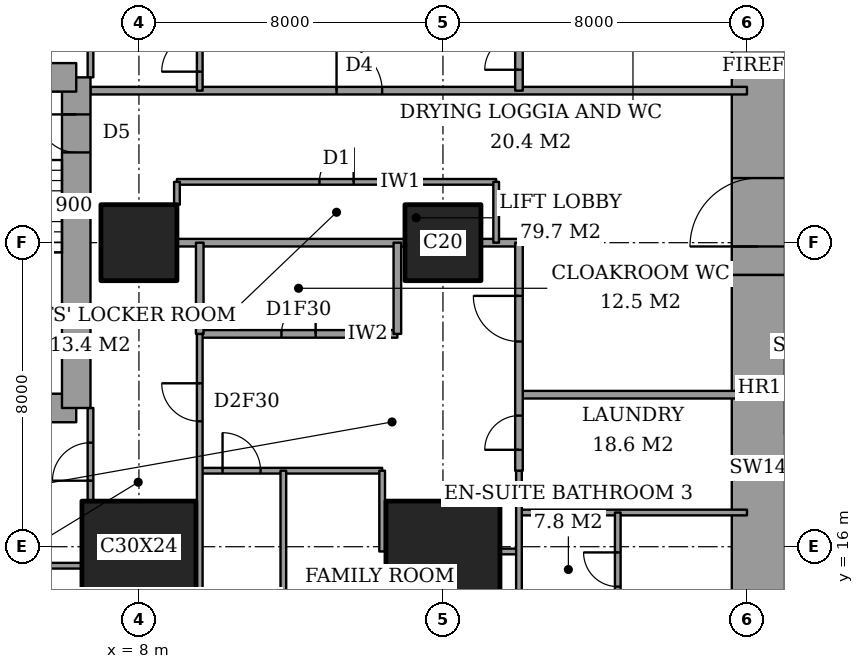
"""IFC4 building model, lengths in metres.
Left out: names, types, materials, properties, quantities, classifications, styles, units other than length and angle.
Written with IfcOpenShell. Run it as: python <this file> out.ifc"""

import sys

from ifc_helpers import new_model, si_unit, direction, frame, frame_2d, origin, origin_2d, place, context, subcontext, project, spatial, rectangle, extrude, element, fill, save


model = new_model("IFC4")
c1 = context("Model", 3, precision=1e-05, world=origin(), true_north=direction((0.0, 1.0)))
c2 = subcontext(c1, "Body", "Model", "MODEL_VIEW")
j1 = project(units=[si_unit("LENGTHUNIT", "METRE"), si_unit("PLANEANGLEUNIT", "RADIAN")], contexts=[c1])
p1 = place(None, origin())
s1 = spatial("IfcSite", under=j1, at=p1, CompositionType="ELEMENT")
p2 = place(p1, origin())
s2 = spatial("IfcBuilding", under=s1, at=p2, CompositionType="ELEMENT")
p3 = place(p2, frame((0.0, 0.0, 58.4)))
s3 = spatial("IfcBuildingStorey", under=s2, at=p3, CompositionType="ELEMENT", Elevation=58.4)
p4 = place(p3, frame((8.0, 16.0, 0.0), z_axis=(0.0, 0.0, 1.0), x_axis=(1.0, 0.0, 0.0)))
e1 = element("IfcColumn", 1, at=p4, inside=s3, PredefinedType="COLUMN", context=c2, shape_type="SweptSolid", body=[
    extrude(rectangle(XDim=3.0, YDim=2.4, at=origin_2d()), origin(), (0.0, 0.0, 1.0), 3.6),
])
p5 = place(p3, frame((8.0, 24.0, 0.0), z_axis=(0.0, 0.0, 1.0), x_axis=(1.0, 0.0, 0.0)))
e2 = element("IfcColumn", 2, at=p5, inside=s3, PredefinedType="COLUMN", context=c2, shape_type="SweptSolid", body=[
    extrude(rectangle(XDim=2.0, YDim=2.0, at=origin_2d()), origin(), (0.0, 0.0, 1.0), 3.6),
])
p6 = place(p3, frame((16.0, 16.0, 0.0), z_axis=(0.0, 0.0, 1.0), x_axis=(1.0, 0.0, 0.0)))
e3 = element("IfcColumn", 3, at=p6, inside=s3, PredefinedType="COLUMN", context=c2, shape_type="SweptSolid", body=[
    extrude(rectangle(XDim=3.0, YDim=2.4, at=origin_2d()), origin(), (0.0, 0.0, 1.0), 3.6),
])
p7 = place(p3, frame((16.0, 24.0, 0.0), z_axis=(0.0, 0.0, 1.0), x_axis=(1.0, 0.0, 0.0)))
e4 = element("IfcColumn", 4, at=p7, inside=s3, PredefinedType="COLUMN", context=c2, shape_type="SweptSolid", body=[
    extrude(rectangle(XDim=2.0, YDim=2.0, at=origin_2d()), origin(), (0.0, 0.0, 1.0), 3.6),
])
p8 = place(p3, frame((24.3, 13.0, 0.0), z_axis=(0.0, 0.0, 1.0), x_axis=(0.0, 1.0, 0.0)))
e5 = element("IfcWall", 5, at=p8, inside=s3, PredefinedType="SHEAR", context=c2, shape_type="SweptSolid", body=[
    extrude(rectangle(XDim=10.15, YDim=1.4, at=frame_2d((5.075, 0.0))), origin(), (0.0, 0.0, 1.0), 3.6),
])
p9 = place(p3, frame((24.3, 23.15, 0.0), z_axis=(0.0, 0.0, 1.0), x_axis=(0.0, 1.0, 0.0)))
e6 = element("IfcWall", 6, at=p9, inside=s3, PredefinedType="SHEAR", context=c2, shape_type="SweptSolid", body=[
    extrude(rectangle(XDim=11.85, YDim=1.4, at=frame_2d((5.925, 0.0))), origin(), (0.0, 0.0, 1.0), 3.6),
])
p10 = place(p9, frame((0.75, 0.0, 0.0)))
e7 = element("IfcOpeningElement", 7, at=p10, cuts=e6, PredefinedType="OPENING", context=c2, shape_type="SweptSolid", body=[
    extrude(rectangle(XDim=1.8, YDim=2.4, at=frame_2d((0.9, 1.2))), frame((0.0, 0.71, 0.0), z_axis=(0.0, -1.0, 0.0), x_axis=(1.0, 0.0, 0.0)), (0.0, 0.0, 1.0), 1.42),
])
p11 = place(p3, frame((1.9, 19.65, 0.0), z_axis=(0.0, 0.0, 1.0), x_axis=(1.0, 0.0, 0.0)))
e8 = element("IfcWall", 8, at=p11, inside=s3, PredefinedType="SHEAR", context=c2, shape_type="SweptSolid", body=[
    extrude(rectangle(XDim=4.45, YDim=0.75, at=frame_2d((2.225, 0.0))), origin(), (0.0, 0.0, 1.0), 3.6),
])
p12 = place(p3, frame((6.35, 19.65, 0.0), z_axis=(0.0, 0.0, 1.0), x_axis=(0.0, 1.0, 0.0)))
e9 = element("IfcWall", 9, at=p12, inside=s3, PredefinedType="SHEAR", context=c2, shape_type="SweptSolid", body=[
    extrude(rectangle(XDim=8.7, YDim=0.75, at=frame_2d((4.35, 0.0))), origin(), (0.0, 0.0, 1.0), 3.6),
])
p13 = place(p12, frame((6.725, 0.0, 0.0)))
e10 = element("IfcOpeningElement", 10, at=p13, cuts=e9, PredefinedType="OPENING", context=c2, shape_type="SweptSolid", body=[
    extrude(rectangle(XDim=1.0, YDim=2.1, at=frame_2d((0.5, 1.05))), frame((0.0, 0.385, 0.0), z_axis=(0.0, -1.0, 0.0), x_axis=(1.0, 0.0, 0.0)), (0.0, 0.0, 1.0), 0.77),
])
p14 = place(p3, frame((6.35, 28.35, 0.0), z_axis=(0.0, 0.0, 1.0), x_axis=(-1.0, 0.0, 0.0)))
e11 = element("IfcWall", 11, at=p14, inside=s3, PredefinedType="SHEAR", context=c2, shape_type="SweptSolid", body=[
    extrude(rectangle(XDim=4.45, YDim=0.75, at=frame_2d((2.225, 0.0))), origin(), (0.0, 0.0, 1.0), 3.6),
])
p15 = place(p3, frame((1.35, 15.5, 0.0), z_axis=(0.0, 0.0, 1.0), x_axis=(1.0, 0.0, 0.0)))
e12 = element("IfcWall", 12, at=p15, inside=s3, PredefinedType="PARTITIONING", context=c2, shape_type="SweptSolid", body=[
    extrude(rectangle(XDim=5.15, YDim=0.15, at=frame_2d((2.575, 0.0))), origin(), (0.0, 0.0, 1.0), 3.35),
])
p16 = place(p3, frame((17.5, 15.875, 0.0), z_axis=(0.0, 0.0, 1.0), x_axis=(1.0, 0.0, 0.0)))
e13 = element("IfcWall", 13, at=p16, inside=s3, PredefinedType="PARTITIONING", context=c2, shape_type="SweptSolid", body=[
    extrude(rectangle(XDim=0.5, YDim=0.15, at=frame_2d((0.25, 0.0))), origin(), (0.0, 0.0, 1.0), 2.634),
])
p17 = place(p3, frame((18.0, 16.9, 0.0), z_axis=(0.0, 0.0, 1.0), x_axis=(1.0, 0.0, 0.0)))
e14 = element("IfcWall", 14, at=p17, inside=s3, PredefinedType="PARTITIONING", context=c2, shape_type="SweptSolid", body=[
    extrude(rectangle(XDim=6.0, YDim=0.15, at=frame_2d((3.0, 0.0))), origin(), (0.0, 0.0, 1.0), 3.35),
])
p18 = place(p3, frame((9.6, 18.0, 0.0), z_axis=(0.0, 0.0, 1.0), x_axis=(1.0, 0.0, 0.0)))
e15 = element("IfcWall", 15, at=p18, inside=s3, PredefinedType="PARTITIONING", context=c2, shape_type="SweptSolid", body=[
    extrude(rectangle(XDim=4.8, YDim=0.15, at=frame_2d((2.4, 0.0))), origin(), (0.0, 0.0, 1.0), 3.35),
])
p19 = place(p18, frame((0.6, 0.0, 0.0)))
e16 = element("IfcOpeningElement", 16, at=p19, cuts=e15, PredefinedType="OPENING", context=c2, shape_type="SweptSolid", body=[
    extrude(rectangle(XDim=1.0, YDim=2.1, at=frame_2d((0.5, 1.05))), frame((0.0, 0.085, 0.0), z_axis=(0.0, -1.0, 0.0), x_axis=(1.0, 0.0, 0.0)), (0.0, 0.0, 1.0), 0.17),
])
p20 = place(p3, frame((18.0, 20.0, 0.0), z_axis=(0.0, 0.0, 1.0), x_axis=(1.0, 0.0, 0.0)))
e17 = element("IfcWall", 17, at=p20, inside=s3, PredefinedType="PARTITIONING", context=c2, shape_type="SweptSolid", body=[
    extrude(rectangle(XDim=6.0, YDim=0.2, at=frame_2d((3.0, 0.0))), origin(), (0.0, 0.0, 1.0), 3.35),
])
p21 = place(p3, frame((9.6, 21.6, 0.0), z_axis=(0.0, 0.0, 1.0), x_axis=(1.0, 0.0, 0.0)))
e18 = element("IfcWall", 18, at=p21, inside=s3, PredefinedType="PARTITIONING", context=c2, shape_type="SweptSolid", body=[
    extrude(rectangle(XDim=5.2, YDim=0.2, at=frame_2d((2.6, 0.0))), origin(), (0.0, 0.0, 1.0), 3.35),
])
p22 = place(p21, frame((2.15, 0.0, 0.0)))
e19 = element("IfcOpeningElement", 19, at=p22, cuts=e18, PredefinedType="OPENING", context=c2, shape_type="SweptSolid", body=[
    extrude(rectangle(XDim=0.9, YDim=2.1, at=frame_2d((0.45, 1.05))), frame((0.0, 0.11, 0.0), z_axis=(0.0, -1.0, 0.0), x_axis=(1.0, 0.0, 0.0)), (0.0, 0.0, 1.0), 0.22),
])
p23 = place(p3, frame((9.0, 24.0, 0.0), z_axis=(0.0, 0.0, 1.0), x_axis=(1.0, 0.0, 0.0)))
e20 = element("IfcWall", 20, at=p23, inside=s3, PredefinedType="PARTITIONING", context=c2, shape_type="SweptSolid", body=[
    extrude(rectangle(XDim=6.0, YDim=0.2, at=frame_2d((3.0, 0.0))), origin(), (0.0, 0.0, 1.0), 3.35),
])
p24 = place(p3, frame((17.0, 24.0, 0.0), z_axis=(0.0, 0.0, 1.0), x_axis=(1.0, 0.0, 0.0)))
e21 = element("IfcWall", 21, at=p24, inside=s3, PredefinedType="PARTITIONING", context=c2, shape_type="SweptSolid", body=[
    extrude(rectangle(XDim=1.0, YDim=0.2, at=frame_2d((0.5, 0.0))), origin(), (0.0, 0.0, 1.0), 3.35),
])
p25 = place(p3, frame((9.0, 25.6, 0.0), z_axis=(0.0, 0.0, 1.0), x_axis=(1.0, 0.0, 0.0)))
e22 = element("IfcWall", 22, at=p25, inside=s3, PredefinedType="PARTITIONING", context=c2, shape_type="SweptSolid", body=[
    extrude(rectangle(XDim=8.4, YDim=0.15, at=frame_2d((4.2, 0.0))), origin(), (0.0, 0.0, 1.0), 3.35),
])
p26 = place(p25, frame((3.75, 0.0, 0.0)))
e23 = element("IfcOpeningElement", 23, at=p26, cuts=e22, PredefinedType="OPENING", context=c2, shape_type="SweptSolid", body=[
    extrude(rectangle(XDim=0.9, YDim=2.1, at=frame_2d((0.45, 1.05))), frame((0.0, 0.085, 0.0), z_axis=(0.0, -1.0, 0.0), x_axis=(1.0, 0.0, 0.0)), (0.0, 0.0, 1.0), 0.17),
])
p27 = place(p3, frame((6.725, 28.0, 0.0), z_axis=(0.0, 0.0, 1.0), x_axis=(1.0, 0.0, 0.0)))
e24 = element("IfcWall", 24, at=p27, inside=s3, PredefinedType="PARTITIONING", context=c2, shape_type="SweptSolid", body=[
    extrude(rectangle(XDim=17.275, YDim=0.2, at=frame_2d((8.637, 0.0))), origin(), (0.0, 0.0, 1.0), 3.35),
])
p28 = place(p27, frame((6.475, 0.0, 0.0)))
e25 = element("IfcOpeningElement", 25, at=p28, cuts=e24, PredefinedType="OPENING", context=c2, shape_type="SweptSolid", body=[
    extrude(rectangle(XDim=1.2, YDim=2.4, at=frame_2d((0.6, 1.2))), frame((0.0, 0.11, 0.0), z_axis=(0.0, -1.0, 0.0), x_axis=(1.0, 0.0, 0.0)), (0.0, 0.0, 1.0), 0.22),
])
p29 = place(p3, frame((6.725, 17.2, 0.0), z_axis=(0.0, 0.0, 1.0), x_axis=(0.0, 1.0, 0.0)))
e26 = element("IfcWall", 26, at=p29, inside=s3, PredefinedType="PARTITIONING", context=c2, shape_type="SweptSolid", body=[
    extrude(rectangle(XDim=2.45, YDim=0.15, at=frame_2d((1.225, 0.0))), origin(), (0.0, 0.0, 1.0), 3.35),
])
p30 = place(p29, frame((0.538, 0.0, 0.0)))
e27 = element("IfcOpeningElement", 27, at=p30, cuts=e26, PredefinedType="OPENING", context=c2, shape_type="SweptSolid", body=[
    extrude(rectangle(XDim=1.0, YDim=2.1, at=frame_2d((0.5, 1.05))), frame((0.0, 0.085, 0.0), z_axis=(0.0, -1.0, 0.0), x_axis=(1.0, 0.0, 0.0)), (0.0, 0.0, 1.0), 0.17),
])
p31 = place(p3, frame((6.725, 28.35, 0.0), z_axis=(0.0, 0.0, 1.0), x_axis=(0.0, 1.0, 0.0)))
e28 = element("IfcWall", 28, at=p31, inside=s3, PredefinedType="PARTITIONING", context=c2, shape_type="SweptSolid", body=[
    extrude(rectangle(XDim=2.45, YDim=0.15, at=frame_2d((1.225, 0.0))), origin(), (0.0, 0.0, 1.0), 3.35),
])
p32 = place(p31, frame((0.913, 0.0, 0.0)))
e29 = element("IfcOpeningElement", 29, at=p32, cuts=e28, PredefinedType="OPENING", context=c2, shape_type="SweptSolid", body=[
    extrude(rectangle(XDim=1.0, YDim=2.1, at=frame_2d((0.5, 1.05))), frame((0.0, 0.085, 0.0), z_axis=(0.0, -1.0, 0.0), x_axis=(1.0, 0.0, 0.0)), (0.0, 0.0, 1.0), 0.17),
])
p33 = place(p3, frame((9.0, 25.0, 0.0), z_axis=(0.0, 0.0, 1.0), x_axis=(0.0, 1.0, 0.0)))
e30 = element("IfcWall", 30, at=p33, inside=s3, PredefinedType="PARTITIONING", context=c2, shape_type="SweptSolid", body=[
    extrude(rectangle(XDim=0.6, YDim=0.15, at=frame_2d((0.3, 0.0))), origin(), (0.0, 0.0, 1.0), 3.35),
])
p34 = place(p3, frame((9.6, 21.6, 0.0), z_axis=(0.0, 0.0, 1.0), x_axis=(0.0, 1.0, 0.0)))
e31 = element("IfcWall", 31, at=p34, inside=s3, PredefinedType="PARTITIONING", context=c2, shape_type="SweptSolid", body=[
    extrude(rectangle(XDim=2.4, YDim=0.2, at=frame_2d((1.2, 0.0))), origin(), (0.0, 0.0, 1.0), 3.35),
])
p35 = place(p3, frame((9.6, 10.6, 0.0), z_axis=(0.0, 0.0, 1.0), x_axis=(0.0, 1.0, 0.0)))
e32 = element("IfcWall", 32, at=p35, inside=s3, PredefinedType="PARTITIONING", context=c2, shape_type="SweptSolid", body=[
    extrude(rectangle(XDim=11.0, YDim=0.15, at=frame_2d((5.5, 0.0))), origin(), (0.0, 0.0, 1.0), 3.35),
])
p36 = place(p35, frame((8.7, 0.0, 0.0)))
e33 = element("IfcOpeningElement", 33, at=p36, cuts=e32, PredefinedType="OPENING", context=c2, shape_type="SweptSolid", body=[
    extrude(rectangle(XDim=1.0, YDim=2.1, at=frame_2d((0.5, 1.05))), frame((0.0, 0.085, 0.0), z_axis=(0.0, -1.0, 0.0), x_axis=(1.0, 0.0, 0.0)), (0.0, 0.0, 1.0), 0.17),
])
p37 = place(p3, frame((9.6, 28.0, 0.0), z_axis=(0.0, 0.0, 1.0), x_axis=(0.0, 1.0, 0.0)))
e34 = element("IfcWall", 34, at=p37, inside=s3, PredefinedType="PARTITIONING", context=c2, shape_type="SweptSolid", body=[
    extrude(rectangle(XDim=9.4, YDim=0.15, at=frame_2d((4.7, 0.0))), origin(), (0.0, 0.0, 1.0), 3.35),
])
p38 = place(p37, frame((0.5, 0.0, 0.0)))
e35 = element("IfcOpeningElement", 35, at=p38, cuts=e34, PredefinedType="OPENING", context=c2, shape_type="SweptSolid", body=[
    extrude(rectangle(XDim=1.0, YDim=2.1, at=frame_2d((0.5, 1.05))), frame((0.0, 0.085, 0.0), z_axis=(0.0, -1.0, 0.0), x_axis=(1.0, 0.0, 0.0)), (0.0, 0.0, 1.0), 0.17),
])
p39 = place(p3, frame((11.8, 10.6, 0.0), z_axis=(0.0, 0.0, 1.0), x_axis=(0.0, 1.0, 0.0)))
e36 = element("IfcWall", 36, at=p39, inside=s3, PredefinedType="PARTITIONING", context=c2, shape_type="SweptSolid", body=[
    extrude(rectangle(XDim=7.4, YDim=0.15, at=frame_2d((3.7, 0.0))), origin(), (0.0, 0.0, 1.0), 3.35),
])
p40 = place(p3, frame((14.4, 15.875, 0.0), z_axis=(0.0, 0.0, 1.0), x_axis=(0.0, 1.0, 0.0)))
e37 = element("IfcWall", 37, at=p40, inside=s3, PredefinedType="PARTITIONING", context=c2, shape_type="SweptSolid", body=[
    extrude(rectangle(XDim=2.125, YDim=0.15, at=frame_2d((1.062, 0.0))), origin(), (0.0, 0.0, 1.0), 3.35),
])
p41 = place(p3, frame((14.8, 21.6, 0.0), z_axis=(0.0, 0.0, 1.0), x_axis=(0.0, 1.0, 0.0)))
e38 = element("IfcWall", 38, at=p41, inside=s3, PredefinedType="PARTITIONING", context=c2, shape_type="SweptSolid", body=[
    extrude(rectangle(XDim=2.4, YDim=0.2, at=frame_2d((1.2, 0.0))), origin(), (0.0, 0.0, 1.0), 3.35),
])
p42 = place(p3, frame((17.4, 24.0, 0.0), z_axis=(0.0, 0.0, 1.0), x_axis=(0.0, 1.0, 0.0)))
e39 = element("IfcWall", 39, at=p42, inside=s3, PredefinedType="PARTITIONING", context=c2, shape_type="SweptSolid", body=[
    extrude(rectangle(XDim=1.6, YDim=0.15, at=frame_2d((0.8, 0.0))), origin(), (0.0, 0.0, 1.0), 3.35),
])
p43 = place(p3, frame((18.0, 18.0, 0.0), z_axis=(0.0, 0.0, 1.0), x_axis=(0.0, 1.0, 0.0)))
e40 = element("IfcWall", 40, at=p43, inside=s3, PredefinedType="PARTITIONING", context=c2, shape_type="SweptSolid", body=[
    extrude(rectangle(XDim=6.0, YDim=0.2, at=frame_2d((3.0, 0.0))), origin(), (0.0, 0.0, 1.0), 3.35),
])
p44 = place(p43, frame((3.4, 0.0, 0.0)))
e41 = element("IfcOpeningElement", 41, at=p44, cuts=e40, PredefinedType="OPENING", context=c2, shape_type="SweptSolid", body=[
    extrude(rectangle(XDim=1.2, YDim=2.4, at=frame_2d((0.6, 1.2))), frame((0.0, 0.11, 0.0), z_axis=(0.0, -1.0, 0.0), x_axis=(1.0, 0.0, 0.0)), (0.0, 0.0, 1.0), 0.22),
])
p45 = place(p43, frame((0.55, 0.0, 0.0)))
e42 = element("IfcOpeningElement", 42, at=p45, cuts=e40, PredefinedType="OPENING", context=c2, shape_type="SweptSolid", body=[
    extrude(rectangle(XDim=0.9, YDim=2.1, at=frame_2d((0.45, 1.05))), frame((0.0, 0.11, 0.0), z_axis=(0.0, -1.0, 0.0), x_axis=(1.0, 0.0, 0.0)), (0.0, 0.0, 1.0), 0.22),
])
p46 = place(p3, frame((18.0, 28.0, 0.0), z_axis=(0.0, 0.0, 1.0), x_axis=(0.0, 1.0, 0.0)))
e43 = element("IfcWall", 43, at=p46, inside=s3, PredefinedType="PARTITIONING", context=c2, shape_type="SweptSolid", body=[
    extrude(rectangle(XDim=3.4, YDim=0.2, at=frame_2d((1.7, 0.0))), origin(), (0.0, 0.0, 1.0), 3.35),
])
p47 = place(p46, frame((0.55, 0.0, 0.0)))
e44 = element("IfcOpeningElement", 44, at=p47, cuts=e43, PredefinedType="OPENING", context=c2, shape_type="SweptSolid", body=[
    extrude(rectangle(XDim=0.9, YDim=2.1, at=frame_2d((0.45, 1.05))), frame((0.0, 0.11, 0.0), z_axis=(0.0, -1.0, 0.0), x_axis=(1.0, 0.0, 0.0)), (0.0, 0.0, 1.0), 0.22),
])
p48 = place(p3, frame((18.0, 10.6, 0.0), z_axis=(0.0, 0.0, 1.0), x_axis=(0.0, 1.0, 0.0)))
e45 = element("IfcWall", 45, at=p48, inside=s3, PredefinedType="PARTITIONING", context=c2, shape_type="SweptSolid", body=[
    extrude(rectangle(XDim=7.4, YDim=0.15, at=frame_2d((3.7, 0.0))), origin(), (0.0, 0.0, 1.0), 3.35),
])
p49 = place(p3, frame((20.6, 13.9, 0.0), z_axis=(0.0, 0.0, 1.0), x_axis=(0.0, 1.0, 0.0)))
e46 = element("IfcWall", 46, at=p49, inside=s3, PredefinedType="PARTITIONING", context=c2, shape_type="SweptSolid", body=[
    extrude(rectangle(XDim=3.0, YDim=0.15, at=frame_2d((1.5, 0.0))), origin(), (0.0, 0.0, 1.0), 3.35),
])
p50 = place(p49, frame((1.05, 0.0, 0.0)))
e47 = element("IfcOpeningElement", 47, at=p50, cuts=e46, PredefinedType="OPENING", context=c2, shape_type="SweptSolid", body=[
    extrude(rectangle(XDim=0.9, YDim=2.1, at=frame_2d((0.45, 1.05))), frame((0.0, 0.085, 0.0), z_axis=(0.0, -1.0, 0.0), x_axis=(1.0, 0.0, 0.0)), (0.0, 0.0, 1.0), 0.17),
])
p51 = place(p30, origin())
e48 = element("IfcDoor", 48, at=p51, inside=s3, OperationType="SINGLE_SWING_RIGHT", PredefinedType="DOOR", context=c2, shape_type="SweptSolid", body=[
    extrude(rectangle(XDim=1.0, YDim=2.1, at=frame_2d((0.5, 1.05))), frame((0.0, 0.025, 0.0), z_axis=(0.0, -1.0, 0.0), x_axis=(1.0, 0.0, 0.0)), (0.0, 0.0, 1.0), 0.05),
])
fill(e27, e48)
p52 = place(p36, origin())
e49 = element("IfcDoor", 49, at=p52, inside=s3, OperationType="SINGLE_SWING_LEFT", PredefinedType="DOOR", context=c2, shape_type="SweptSolid", body=[
    extrude(rectangle(XDim=1.0, YDim=2.1, at=frame_2d((0.5, 1.05))), frame((0.0, 0.025, 0.0), z_axis=(0.0, -1.0, 0.0), x_axis=(1.0, 0.0, 0.0)), (0.0, 0.0, 1.0), 0.05),
])
fill(e33, e49)
p53 = place(p22, origin())
e50 = element("IfcDoor", 50, at=p53, inside=s3, OperationType="SINGLE_SWING_LEFT", PredefinedType="DOOR", context=c2, shape_type="SweptSolid", body=[
    extrude(rectangle(XDim=0.9, YDim=2.1, at=frame_2d((0.45, 1.05))), frame((0.0, 0.025, 0.0), z_axis=(0.0, -1.0, 0.0), x_axis=(1.0, 0.0, 0.0)), (0.0, 0.0, 1.0), 0.05),
])
fill(e19, e50)
p54 = place(p44, origin())
e51 = element("IfcDoor", 51, at=p54, inside=s3, OperationType="SINGLE_SWING_LEFT", PredefinedType="DOOR", context=c2, shape_type="SweptSolid", body=[
    extrude(rectangle(XDim=1.2, YDim=2.4, at=frame_2d((0.6, 1.2))), frame((0.0, 0.025, 0.0), z_axis=(0.0, -1.0, 0.0), x_axis=(1.0, 0.0, 0.0)), (0.0, 0.0, 1.0), 0.05),
])
fill(e41, e51)
p55 = place(p19, origin())
e52 = element("IfcDoor", 52, at=p55, inside=s3, OperationType="SINGLE_SWING_RIGHT", PredefinedType="DOOR", context=c2, shape_type="SweptSolid", body=[
    extrude(rectangle(XDim=1.0, YDim=2.1, at=frame_2d((0.5, 1.05))), frame((0.0, 0.025, 0.0), z_axis=(0.0, -1.0, 0.0), x_axis=(1.0, 0.0, 0.0)), (0.0, 0.0, 1.0), 0.05),
])
fill(e16, e52)
p56 = place(p50, origin())
e53 = element("IfcDoor", 53, at=p56, inside=s3, OperationType="SINGLE_SWING_LEFT", PredefinedType="DOOR", context=c2, shape_type="SweptSolid", body=[
    extrude(rectangle(XDim=0.9, YDim=2.1, at=frame_2d((0.45, 1.05))), frame((0.0, 0.025, 0.0), z_axis=(0.0, -1.0, 0.0), x_axis=(1.0, 0.0, 0.0)), (0.0, 0.0, 1.0), 0.05),
])
fill(e47, e53)
p57 = place(p45, origin())
e54 = element("IfcDoor", 54, at=p57, inside=s3, OperationType="SINGLE_SWING_RIGHT", PredefinedType="DOOR", context=c2, shape_type="SweptSolid", body=[
    extrude(rectangle(XDim=0.9, YDim=2.1, at=frame_2d((0.45, 1.05))), frame((0.0, 0.025, 0.0), z_axis=(0.0, -1.0, 0.0), x_axis=(1.0, 0.0, 0.0)), (0.0, 0.0, 1.0), 0.05),
])
fill(e42, e54)
p58 = place(p38, origin())
e55 = element("IfcDoor", 55, at=p58, inside=s3, OperationType="SINGLE_SWING_RIGHT", PredefinedType="DOOR", context=c2, shape_type="SweptSolid", body=[
    extrude(rectangle(XDim=1.0, YDim=2.1, at=frame_2d((0.5, 1.05))), frame((0.0, 0.025, 0.0), z_axis=(0.0, -1.0, 0.0), x_axis=(1.0, 0.0, 0.0)), (0.0, 0.0, 1.0), 0.05),
])
fill(e35, e55)
p59 = place(p28, origin())
e56 = element("IfcDoor", 56, at=p59, inside=s3, OperationType="SINGLE_SWING_RIGHT", PredefinedType="DOOR", context=c2, shape_type="SweptSolid", body=[
    extrude(rectangle(XDim=1.2, YDim=2.4, at=frame_2d((0.6, 1.2))), frame((0.0, 0.025, 0.0), z_axis=(0.0, -1.0, 0.0), x_axis=(1.0, 0.0, 0.0)), (0.0, 0.0, 1.0), 0.05),
])
fill(e25, e56)
p60 = place(p47, origin())
e57 = element("IfcDoor", 57, at=p60, inside=s3, OperationType="SINGLE_SWING_RIGHT", PredefinedType="DOOR", context=c2, shape_type="SweptSolid", body=[
    extrude(rectangle(XDim=0.9, YDim=2.1, at=frame_2d((0.45, 1.05))), frame((0.0, 0.025, 0.0), z_axis=(0.0, -1.0, 0.0), x_axis=(1.0, 0.0, 0.0)), (0.0, 0.0, 1.0), 0.05),
])
fill(e44, e57)
p61 = place(p26, origin())
e58 = element("IfcDoor", 58, at=p61, inside=s3, OperationType="SINGLE_SWING_LEFT", PredefinedType="DOOR", context=c2, shape_type="SweptSolid", body=[
    extrude(rectangle(XDim=0.9, YDim=2.1, at=frame_2d((0.45, 1.05))), frame((0.0, 0.025, 0.0), z_axis=(0.0, -1.0, 0.0), x_axis=(1.0, 0.0, 0.0)), (0.0, 0.0, 1.0), 0.05),
])
fill(e23, e58)
p62 = place(p10, origin())
e59 = element("IfcDoor", 59, at=p62, inside=s3, OperationType="DOUBLE_DOOR_DOUBLE_SWING", PredefinedType="DOOR", context=c2, shape_type="SweptSolid", body=[
    extrude(rectangle(XDim=1.8, YDim=2.4, at=frame_2d((0.9, 1.2))), frame((0.0, 0.025, 0.0), z_axis=(0.0, -1.0, 0.0), x_axis=(1.0, 0.0, 0.0)), (0.0, 0.0, 1.0), 0.05),
])
fill(e7, e59)
p63 = place(p13, origin())
e60 = element("IfcDoor", 60, at=p63, inside=s3, OperationType="SINGLE_SWING_LEFT", PredefinedType="DOOR", context=c2, shape_type="SweptSolid", body=[
    extrude(rectangle(XDim=1.0, YDim=2.1, at=frame_2d((0.5, 1.05))), frame((0.0, 0.025, 0.0), z_axis=(0.0, -1.0, 0.0), x_axis=(1.0, 0.0, 0.0)), (0.0, 0.0, 1.0), 0.05),
])
fill(e10, e60)
save(model, sys.argv[1])
